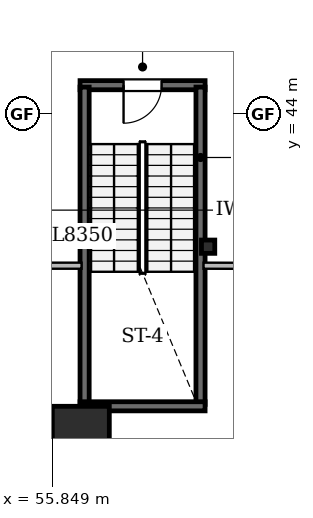
"""IFC4 building model, lengths in metres.
Left out: names, types, materials, properties, quantities, classifications, styles, units other than length and angle.
Written with IfcOpenShell. Run it as: python <this file> out.ifc"""

import sys

from ifc_helpers import new_model, si_unit, direction, frame, frame_2d, origin, origin_2d, place, context, subcontext, project, spatial, rectangle, i_section, extrude, element, fill, save


model = new_model("IFC4")
c1 = context("Model", 3, precision=1e-05, world=origin(), true_north=direction((0.0, 1.0)))
c2 = subcontext(c1, "Body", "Model", "MODEL_VIEW")
j1 = project(units=[si_unit("LENGTHUNIT", "METRE"), si_unit("PLANEANGLEUNIT", "RADIAN")], contexts=[c1])
p1 = place(None, origin())
s1 = spatial("IfcSite", under=j1, at=p1, CompositionType="ELEMENT")
p2 = place(p1, origin())
s2 = spatial("IfcBuilding", under=s1, at=p2, CompositionType="ELEMENT")
p3 = place(p2, frame((0.0, 0.0, 9.6)))
s3 = spatial("IfcBuildingStorey", under=s2, at=p3, CompositionType="ELEMENT", Elevation=9.6)
p4 = place(p3, frame((56.6, 35.8, 0.0), z_axis=(0.0, 0.0, 1.0), x_axis=(1.0, 0.0, 0.0)))
e1 = element("IfcColumn", 1, at=p4, inside=s3, PredefinedType="COLUMN", context=c2, shape_type="SweptSolid", body=[
    extrude(rectangle(XDim=1.5, YDim=1.0, at=origin_2d()), origin(), (0.0, 0.0, 1.0), 4.8),
])
p5 = place(p3, frame((59.95, 40.5, 0.0), z_axis=(0.0, 0.0, 1.0), x_axis=(1.0, 0.0, 0.0)))
e2 = element("IfcColumn", 2, at=p5, inside=s3, PredefinedType="PILASTER", context=c2, shape_type="SweptSolid", body=[
    extrude(i_section(OverallWidth=0.35, OverallDepth=0.35, WebThickness=0.012, FlangeThickness=0.019, FilletRadius=0.02, at=origin_2d()), origin(), (0.0, 0.0, 1.0), 4.8),
])
p6 = place(p3, frame((56.58, 44.75, 0.0), z_axis=(0.0, 0.0, 1.0), x_axis=(1.0, 0.0, 0.0)))
e3 = element("IfcWall", 3, at=p6, inside=s3, PredefinedType="SHEAR", context=c2, shape_type="SweptSolid", body=[
    extrude(rectangle(XDim=3.29, YDim=0.24, at=frame_2d((1.645, 0.0))), origin(), (0.0, 0.0, 1.0), 4.5),
])
p7 = place(p6, frame((1.145, 0.0, 0.0)))
e4 = element("IfcOpeningElement", 4, at=p7, cuts=e3, PredefinedType="OPENING", context=c2, shape_type="SweptSolid", body=[
    extrude(rectangle(XDim=1.0, YDim=2.15, at=frame_2d((0.5, 1.075))), frame((0.0, 0.13, 0.0), z_axis=(0.0, -1.0, 0.0), x_axis=(1.0, 0.0, 0.0)), (0.0, 0.0, 1.0), 0.26),
])
for number, where, z_axis, x_axis in (
    (5, (56.7, 36.35, 0.0), (0.0, 0.0, 1.0), (0.0, 1.0, 0.0)),
    (6, (59.75, 36.35, 0.0), (0.0, 0.0, 1.0), (0.0, 1.0, 0.0)),
):
    element("IfcWall", number, at=place(p3, frame(where, z_axis=z_axis, x_axis=x_axis)), inside=s3, PredefinedType="SHEAR", context=c2, shape_type="SweptSolid", body=[
        extrude(rectangle(XDim=8.35, YDim=0.24, at=frame_2d((4.175, 0.0))), origin(), (0.0, 0.0, 1.0), 4.5),
    ])
p8 = place(p3, frame((56.58, 36.3, 0.0), z_axis=(0.0, 0.0, 1.0), x_axis=(1.0, 0.0, 0.0)))
e7 = element("IfcWall", 7, at=p8, inside=s3, PredefinedType="SHEAR", context=c2, shape_type="SweptSolid", body=[
    extrude(rectangle(XDim=3.29, YDim=0.24, at=frame_2d((1.645, 0.0))), origin(), (0.0, 0.0, 1.0), 4.5),
])
p9 = place(p3, frame((72.79, 39.965, 0.0), z_axis=(0.0, 0.0, 1.0), x_axis=(-0.999996371623, 0.002693833945, 0.0)))
e8 = element("IfcWall", 8, at=p9, inside=s3, PredefinedType="SOLIDWALL", context=c2, shape_type="SweptSolid", body=[
    extrude(rectangle(XDim=12.96, YDim=0.16, at=frame_2d((6.48, 0.0))), origin(), (0.0, 0.0, 1.0), 3.788),
])
p10 = place(p3, frame((56.62, 40.0, 0.0), z_axis=(0.0, 0.0, 1.0), x_axis=(-1.0, 0.0, 0.0)))
e9 = element("IfcWall", 9, at=p10, inside=s3, PredefinedType="SOLIDWALL", context=c2, shape_type="SweptSolid", body=[
    extrude(rectangle(XDim=1.94, YDim=0.16, at=frame_2d((0.97, 0.0))), origin(), (0.0, 0.0, 1.0), 3.588),
])
p11 = place(p7, frame((1.0, 0.0, 0.0), z_axis=(0.0, 0.0, 1.0), x_axis=(-1.0, 0.0, 0.0)))
e10 = element("IfcDoor", 10, at=p11, inside=s3, OperationType="SINGLE_SWING_LEFT", PredefinedType="DOOR", context=c2, shape_type="SweptSolid", body=[
    extrude(rectangle(XDim=1.0, YDim=2.15, at=frame_2d((0.5, 1.075))), frame((0.0, 0.025, 0.0), z_axis=(0.0, -1.0, 0.0), x_axis=(1.0, 0.0, 0.0)), (0.0, 0.0, 1.0), 0.05),
])
fill(e4, e10)
save(model, sys.argv[1])
